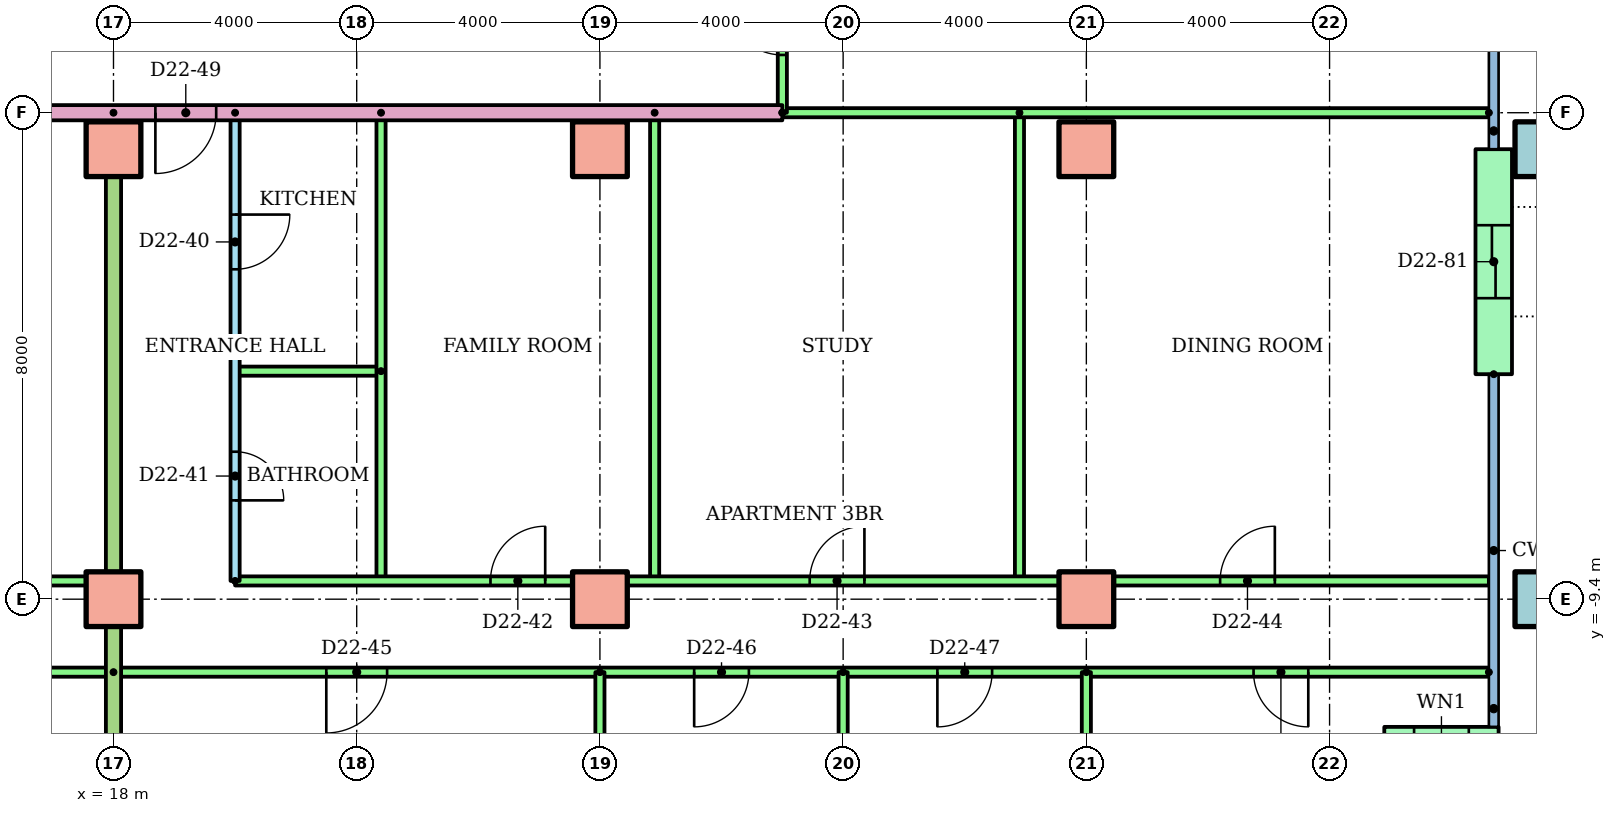
"""IFC4 building model, lengths in metres.
Left out: names, types, materials, properties, quantities, classifications, styles, units other than length and angle.
Written with IfcOpenShell. Run it as: python <this file> out.ifc"""

import sys

from ifc_helpers import new_model, si_unit, direction, frame, frame_2d, origin, origin_2d, place, context, subcontext, project, spatial, rectangle, hollow_rectangle, extrude, element, fill, save


model = new_model("IFC4")
c1 = context("Model", 3, precision=1e-05, world=origin(), true_north=direction((0.0, 1.0)))
c2 = subcontext(c1, "Body", "Model", "MODEL_VIEW")
j1 = project(units=[si_unit("LENGTHUNIT", "METRE"), si_unit("PLANEANGLEUNIT", "RADIAN")], contexts=[c1])
p1 = place(None, origin())
s1 = spatial("IfcSite", under=j1, at=p1, CompositionType="ELEMENT")
p2 = place(p1, origin())
s2 = spatial("IfcBuilding", under=s1, at=p2, CompositionType="ELEMENT")
p3 = place(p2, frame((0.0, 0.0, 87.1)))
s3 = spatial("IfcBuildingStorey", under=s2, at=p3, CompositionType="ELEMENT", Elevation=87.1)
for number, where in (
    (1, (18.0, -9.4, 0.0)),
    (2, (26.0, -9.4, 0.0)),
    (3, (34.0, -9.4, 0.0)),
):
    element("IfcColumn", number, at=place(p3, frame(where)), inside=s3, PredefinedType="COLUMN", context=c2, shape_type="SweptSolid", body=[
        extrude(rectangle(XDim=0.9, YDim=0.9, at=origin_2d()), origin(), (0.0, 0.0, 1.0), 3.2),
    ])
p4 = place(p3, frame((41.5, -9.4, 0.0)))
e4 = element("IfcColumn", 4, at=p4, inside=s3, PredefinedType="COLUMN", context=c2, shape_type="SweptSolid", body=[
    extrude(hollow_rectangle(XDim=0.9, YDim=0.9, WallThickness=0.045, at=origin_2d()), origin(), (0.0, 0.0, 1.0), 3.2),
])
for number, where in (
    (5, (18.0, -2.0, 0.0)),
    (6, (26.0, -2.0, 0.0)),
    (7, (34.0, -2.0, 0.0)),
):
    element("IfcColumn", number, at=place(p3, frame(where)), inside=s3, PredefinedType="COLUMN", context=c2, shape_type="SweptSolid", body=[
        extrude(rectangle(XDim=0.9, YDim=0.9, at=origin_2d()), origin(), (0.0, 0.0, 1.0), 3.2),
    ])
p5 = place(p3, frame((41.5, -2.0, 0.0)))
e8 = element("IfcColumn", 8, at=p5, inside=s3, PredefinedType="COLUMN", context=c2, shape_type="SweptSolid", body=[
    extrude(hollow_rectangle(XDim=0.9, YDim=0.9, WallThickness=0.045, at=origin_2d()), origin(), (0.0, 0.0, 1.0), 3.2),
])
p6 = place(p3, frame((38.9, -11.8, 0.0)))
e9 = element("IfcWall", 9, at=p6, inside=s3, PredefinedType="STANDARD", context=c2, shape_type="SweptSolid", body=[
    extrude(rectangle(XDim=1.88, YDim=0.6, at=frame_2d((0.94, 0.0))), origin(), (0.0, 0.0, 1.0), 2.92),
])
p7 = place(p6, frame((0.49, 0.0, 0.9)))
e10 = element("IfcOpeningElement", 10, at=p7, cuts=e9, PredefinedType="OPENING", context=c2, shape_type="SweptSolid", body=[
    extrude(rectangle(XDim=0.9, YDim=1.5, at=frame_2d((0.45, 0.75))), frame((0.0, 0.31, 0.0), z_axis=(0.0, -1.0, 0.0), x_axis=(1.0, 0.0, 0.0)), (0.0, 0.0, 1.0), 0.62),
])
p8 = place(p3, frame((40.7, -5.7, 0.0), z_axis=(0.0, 0.0, 1.0), x_axis=(0.0, 1.0, 0.0)))
e11 = element("IfcWall", 11, at=p8, inside=s3, PredefinedType="STANDARD", context=c2, shape_type="SweptSolid", body=[
    extrude(rectangle(XDim=3.7, YDim=0.6, at=frame_2d((1.85, 0.0))), origin(), (0.0, 0.0, 1.0), 2.92),
])
p9 = place(p8, frame((1.25, 0.0, 0.0)))
e12 = element("IfcOpeningElement", 12, at=p9, cuts=e11, PredefinedType="OPENING", context=c2, shape_type="SweptSolid", body=[
    extrude(rectangle(XDim=1.2, YDim=2.1, at=frame_2d((0.6, 1.05))), frame((0.0, 0.31, 0.0), z_axis=(0.0, -1.0, 0.0), x_axis=(1.0, 0.0, 0.0)), (0.0, 0.0, 1.0), 0.62),
])
p10 = place(p3, frame((4.0, -9.1, 0.0)))
e13 = element("IfcWall", 13, at=p10, inside=s3, PredefinedType="PARTITIONING", context=c2, shape_type="SweptSolid", body=[
    extrude(rectangle(XDim=14.0, YDim=0.15, at=frame_2d((7.0, 0.0))), origin(), (0.0, 0.0, 1.0), 2.4),
])
p11 = place(p10, frame((3.45, 0.0, 0.0)))
e14 = element("IfcOpeningElement", 14, at=p11, cuts=e13, PredefinedType="OPENING", context=c2, shape_type="SweptSolid", body=[
    extrude(rectangle(XDim=0.9, YDim=2.1, at=frame_2d((0.45, 1.05))), frame((0.0, 0.085, 0.0), z_axis=(0.0, -1.0, 0.0), x_axis=(1.0, 0.0, 0.0)), (0.0, 0.0, 1.0), 0.17),
])
p12 = place(p10, frame((6.825, 0.0, 0.0)))
e15 = element("IfcOpeningElement", 15, at=p12, cuts=e13, PredefinedType="OPENING", context=c2, shape_type="SweptSolid", body=[
    extrude(rectangle(XDim=0.9, YDim=2.1, at=frame_2d((0.45, 1.05))), frame((0.0, 0.085, 0.0), z_axis=(0.0, -1.0, 0.0), x_axis=(1.0, 0.0, 0.0)), (0.0, 0.0, 1.0), 0.17),
])
p13 = place(p10, frame((11.125, 0.0, 0.0)))
e16 = element("IfcOpeningElement", 16, at=p13, cuts=e13, PredefinedType="OPENING", context=c2, shape_type="SweptSolid", body=[
    extrude(rectangle(XDim=0.9, YDim=2.1, at=frame_2d((0.45, 1.05))), frame((0.0, 0.085, 0.0), z_axis=(0.0, -1.0, 0.0), x_axis=(1.0, 0.0, 0.0)), (0.0, 0.0, 1.0), 0.17),
])
p14 = place(p3, frame((18.0, -10.6, 0.0), z_axis=(0.0, 0.0, 1.0), x_axis=(-1.0, 0.0, 0.0)))
e17 = element("IfcWall", 17, at=p14, inside=s3, PredefinedType="PARTITIONING", context=c2, shape_type="SweptSolid", body=[
    extrude(rectangle(XDim=16.0, YDim=0.15, at=frame_2d((8.0, 0.0))), origin(), (0.0, 0.0, 1.0), 2.4),
])
p15 = place(p14, frame((11.5, 0.0, 0.0)))
e18 = element("IfcOpeningElement", 18, at=p15, cuts=e17, PredefinedType="OPENING", context=c2, shape_type="SweptSolid", body=[
    extrude(rectangle(XDim=1.0, YDim=2.1, at=frame_2d((0.5, 1.05))), frame((0.0, 0.085, 0.0), z_axis=(0.0, -1.0, 0.0), x_axis=(1.0, 0.0, 0.0)), (0.0, 0.0, 1.0), 0.17),
])
p16 = place(p14, frame((5.55, 0.0, 0.0)))
e19 = element("IfcOpeningElement", 19, at=p16, cuts=e17, PredefinedType="OPENING", context=c2, shape_type="SweptSolid", body=[
    extrude(rectangle(XDim=0.9, YDim=2.1, at=frame_2d((0.45, 1.05))), frame((0.0, 0.085, 0.0), z_axis=(0.0, -1.0, 0.0), x_axis=(1.0, 0.0, 0.0)), (0.0, 0.0, 1.0), 0.17),
])
p17 = place(p14, frame((1.55, 0.0, 0.0)))
e20 = element("IfcOpeningElement", 20, at=p17, cuts=e17, PredefinedType="OPENING", context=c2, shape_type="SweptSolid", body=[
    extrude(rectangle(XDim=0.9, YDim=2.1, at=frame_2d((0.45, 1.05))), frame((0.0, 0.085, 0.0), z_axis=(0.0, -1.0, 0.0), x_axis=(1.0, 0.0, 0.0)), (0.0, 0.0, 1.0), 0.17),
])
p18 = place(p3, frame((20.0, -1.4, 0.0), z_axis=(0.0, 0.0, 1.0), x_axis=(0.0, -1.0, 0.0)))
e21 = element("IfcWall", 21, at=p18, inside=s3, PredefinedType="PARTITIONING", context=c2, shape_type="SweptSolid", body=[
    extrude(rectangle(XDim=7.7, YDim=0.15, at=frame_2d((3.85, 0.0))), origin(), (0.0, 0.0, 1.0), 2.4),
])
p19 = place(p18, frame((1.675, 0.0, 0.0)))
e22 = element("IfcOpeningElement", 22, at=p19, cuts=e21, PredefinedType="OPENING", context=c2, shape_type="SweptSolid", body=[
    extrude(rectangle(XDim=0.9, YDim=2.1, at=frame_2d((0.45, 1.05))), frame((0.0, 0.085, 0.0), z_axis=(0.0, -1.0, 0.0), x_axis=(1.0, 0.0, 0.0)), (0.0, 0.0, 1.0), 0.17),
])
p20 = place(p18, frame((5.575, 0.0, 0.0)))
e23 = element("IfcOpeningElement", 23, at=p20, cuts=e21, PredefinedType="OPENING", context=c2, shape_type="SweptSolid", body=[
    extrude(rectangle(XDim=0.8, YDim=2.1, at=frame_2d((0.4, 1.05))), frame((0.0, 0.085, 0.0), z_axis=(0.0, -1.0, 0.0), x_axis=(1.0, 0.0, 0.0)), (0.0, 0.0, 1.0), 0.17),
])
p21 = place(p3, frame((22.4, -5.65, 0.0), z_axis=(0.0, 0.0, 1.0), x_axis=(-1.0, 0.0, 0.0)))
e24 = element("IfcWall", 24, at=p21, inside=s3, PredefinedType="PARTITIONING", context=c2, shape_type="SweptSolid", body=[
    extrude(rectangle(XDim=2.4, YDim=0.15, at=frame_2d((1.2, 0.0))), origin(), (0.0, 0.0, 1.0), 2.4),
])
for number, where, z_axis, x_axis in (
    (25, (22.4, -1.4, 0.0), (0.0, 0.0, 1.0), (0.0, -1.0, 0.0)),
    (26, (26.9, -1.4, 0.0), (0.0, 0.0, 1.0), (0.0, -1.0, 0.0)),
    (27, (32.9, -1.4, 0.0), (0.0, 0.0, 1.0), (0.0, -1.0, 0.0)),
):
    element("IfcWall", number, at=place(p3, frame(where, z_axis=z_axis, x_axis=x_axis)), inside=s3, PredefinedType="PARTITIONING", context=c2, shape_type="SweptSolid", body=[
        extrude(rectangle(XDim=7.7, YDim=0.15, at=frame_2d((3.85, 0.0))), origin(), (0.0, 0.0, 1.0), 2.4),
    ])
p22 = place(p3, frame((20.0, -9.1, 0.0)))
e28 = element("IfcWall", 28, at=p22, inside=s3, PredefinedType="PARTITIONING", context=c2, shape_type="SweptSolid", body=[
    extrude(rectangle(XDim=20.62, YDim=0.15, at=frame_2d((10.31, 0.0))), origin(), (0.0, 0.0, 1.0), 2.4),
])
p23 = place(p22, frame((4.2, 0.0, 0.0)))
e29 = element("IfcOpeningElement", 29, at=p23, cuts=e28, PredefinedType="OPENING", context=c2, shape_type="SweptSolid", body=[
    extrude(rectangle(XDim=0.9, YDim=2.1, at=frame_2d((0.45, 1.05))), frame((0.0, 0.085, 0.0), z_axis=(0.0, -1.0, 0.0), x_axis=(1.0, 0.0, 0.0)), (0.0, 0.0, 1.0), 0.17),
])
p24 = place(p22, frame((9.45, 0.0, 0.0)))
e30 = element("IfcOpeningElement", 30, at=p24, cuts=e28, PredefinedType="OPENING", context=c2, shape_type="SweptSolid", body=[
    extrude(rectangle(XDim=0.9, YDim=2.1, at=frame_2d((0.45, 1.05))), frame((0.0, 0.085, 0.0), z_axis=(0.0, -1.0, 0.0), x_axis=(1.0, 0.0, 0.0)), (0.0, 0.0, 1.0), 0.17),
])
p25 = place(p22, frame((16.2, 0.0, 0.0)))
e31 = element("IfcOpeningElement", 31, at=p25, cuts=e28, PredefinedType="OPENING", context=c2, shape_type="SweptSolid", body=[
    extrude(rectangle(XDim=0.9, YDim=2.1, at=frame_2d((0.45, 1.05))), frame((0.0, 0.085, 0.0), z_axis=(0.0, -1.0, 0.0), x_axis=(1.0, 0.0, 0.0)), (0.0, 0.0, 1.0), 0.17),
])
p26 = place(p3, frame((40.62, -10.6, 0.0), z_axis=(0.0, 0.0, 1.0), x_axis=(-1.0, 0.0, 0.0)))
e32 = element("IfcWall", 32, at=p26, inside=s3, PredefinedType="PARTITIONING", context=c2, shape_type="SweptSolid", body=[
    extrude(rectangle(XDim=22.62, YDim=0.15, at=frame_2d((11.31, 0.0))), origin(), (0.0, 0.0, 1.0), 2.4),
])
p27 = place(p26, frame((18.12, 0.0, 0.0)))
e33 = element("IfcOpeningElement", 33, at=p27, cuts=e32, PredefinedType="OPENING", context=c2, shape_type="SweptSolid", body=[
    extrude(rectangle(XDim=1.0, YDim=2.1, at=frame_2d((0.5, 1.05))), frame((0.0, 0.085, 0.0), z_axis=(0.0, -1.0, 0.0), x_axis=(1.0, 0.0, 0.0)), (0.0, 0.0, 1.0), 0.17),
])
p28 = place(p26, frame((12.17, 0.0, 0.0)))
e34 = element("IfcOpeningElement", 34, at=p28, cuts=e32, PredefinedType="OPENING", context=c2, shape_type="SweptSolid", body=[
    extrude(rectangle(XDim=0.9, YDim=2.1, at=frame_2d((0.45, 1.05))), frame((0.0, 0.085, 0.0), z_axis=(0.0, -1.0, 0.0), x_axis=(1.0, 0.0, 0.0)), (0.0, 0.0, 1.0), 0.17),
])
p29 = place(p26, frame((8.17, 0.0, 0.0)))
e35 = element("IfcOpeningElement", 35, at=p29, cuts=e32, PredefinedType="OPENING", context=c2, shape_type="SweptSolid", body=[
    extrude(rectangle(XDim=0.9, YDim=2.1, at=frame_2d((0.45, 1.05))), frame((0.0, 0.085, 0.0), z_axis=(0.0, -1.0, 0.0), x_axis=(1.0, 0.0, 0.0)), (0.0, 0.0, 1.0), 0.17),
])
p30 = place(p26, frame((2.97, 0.0, 0.0)))
e36 = element("IfcOpeningElement", 36, at=p30, cuts=e32, PredefinedType="OPENING", context=c2, shape_type="SweptSolid", body=[
    extrude(rectangle(XDim=0.9, YDim=2.1, at=frame_2d((0.45, 1.05))), frame((0.0, 0.085, 0.0), z_axis=(0.0, -1.0, 0.0), x_axis=(1.0, 0.0, 0.0)), (0.0, 0.0, 1.0), 0.17),
])
p31 = place(p3, frame((26.0, -10.6, 0.0), z_axis=(0.0, 0.0, 1.0), x_axis=(0.0, -1.0, 0.0)))
e37 = element("IfcWall", 37, at=p31, inside=s3, PredefinedType="PARTITIONING", context=c2, shape_type="SweptSolid", body=[
    extrude(rectangle(XDim=5.61, YDim=0.15, at=frame_2d((2.805, 0.0))), origin(), (0.0, 0.0, 1.0), 2.4),
])
p32 = place(p3, frame((30.0, -10.6, 0.0), z_axis=(0.0, 0.0, 1.0), x_axis=(0.0, -1.0, 0.0)))
e38 = element("IfcWall", 38, at=p32, inside=s3, PredefinedType="PARTITIONING", context=c2, shape_type="SweptSolid", body=[
    extrude(rectangle(XDim=5.621, YDim=0.15, at=frame_2d((2.811, 0.0))), origin(), (0.0, 0.0, 1.0), 2.4),
])
p33 = place(p3, frame((34.0, -10.6, 0.0), z_axis=(0.0, 0.0, 1.0), x_axis=(0.0, -1.0, 0.0)))
e39 = element("IfcWall", 39, at=p33, inside=s3, PredefinedType="PARTITIONING", context=c2, shape_type="SweptSolid", body=[
    extrude(rectangle(XDim=5.61, YDim=0.15, at=frame_2d((2.805, 0.0))), origin(), (0.0, 0.0, 1.0), 2.4),
])
p34 = place(p3, frame((18.0, -1.4, 0.0), z_axis=(0.0, 0.0, 1.0), x_axis=(0.0, -1.0, 0.0)))
e40 = element("IfcWall", 40, at=p34, inside=s3, PredefinedType="PARTITIONING", context=c2, shape_type="SweptSolid", body=[
    extrude(rectangle(XDim=14.81, YDim=0.25, at=frame_2d((7.405, 0.0))), origin(), (0.0, 0.0, 1.0), 2.4),
])
p35 = place(p3, frame((29.0, -1.4, 0.0), z_axis=(0.0, 0.0, 1.0), x_axis=(-1.0, 0.0, 0.0)))
e41 = element("IfcWall", 41, at=p35, inside=s3, PredefinedType="PARTITIONING", context=c2, shape_type="SweptSolid", body=[
    extrude(rectangle(XDim=15.0, YDim=0.25, at=frame_2d((7.5, 0.0))), origin(), (0.0, 0.0, 1.0), 2.4),
])
p36 = place(p35, frame((9.311, 0.0, 0.0)))
e42 = element("IfcOpeningElement", 42, at=p36, cuts=e41, PredefinedType="OPENING", context=c2, shape_type="SweptSolid", body=[
    extrude(rectangle(XDim=1.0, YDim=2.1, at=frame_2d((0.5, 1.05))), frame((0.0, 0.135, 0.0), z_axis=(0.0, -1.0, 0.0), x_axis=(1.0, 0.0, 0.0)), (0.0, 0.0, 1.0), 0.27),
])
p37 = place(p3, frame((40.62, -1.4, 0.0), z_axis=(0.0, 0.0, 1.0), x_axis=(-1.0, 0.0, 0.0)))
e43 = element("IfcWall", 43, at=p37, inside=s3, PredefinedType="PARTITIONING", context=c2, shape_type="SweptSolid", body=[
    extrude(rectangle(XDim=11.62, YDim=0.15, at=frame_2d((5.81, 0.0))), origin(), (0.0, 0.0, 1.0), 2.4),
])
p38 = place(p3, frame((29.0, -1.4, 0.0), z_axis=(0.0, 0.0, 1.0), x_axis=(0.0, 1.0, 0.0)))
e44 = element("IfcWall", 44, at=p38, inside=s3, PredefinedType="PARTITIONING", context=c2, shape_type="SweptSolid", body=[
    extrude(rectangle(XDim=2.8, YDim=0.15, at=frame_2d((1.4, 0.0))), origin(), (0.0, 0.0, 1.0), 2.4),
])
p39 = place(p38, frame((0.95, 0.0, 0.0)))
e45 = element("IfcOpeningElement", 45, at=p39, cuts=e44, PredefinedType="OPENING", context=c2, shape_type="SweptSolid", body=[
    extrude(rectangle(XDim=0.9, YDim=2.1, at=frame_2d((0.45, 1.05))), frame((0.0, 0.085, 0.0), z_axis=(0.0, -1.0, 0.0), x_axis=(1.0, 0.0, 0.0)), (0.0, 0.0, 1.0), 0.17),
])
p40 = place(p19, origin())
e46 = element("IfcDoor", 46, at=p40, inside=s3, OperationType="SINGLE_SWING_LEFT", PredefinedType="DOOR", context=c2, shape_type="SweptSolid", body=[
    extrude(rectangle(XDim=0.9, YDim=2.1, at=frame_2d((0.45, 1.05))), frame((0.0, 0.025, 0.0), z_axis=(0.0, -1.0, 0.0), x_axis=(1.0, 0.0, 0.0)), (0.0, 0.0, 1.0), 0.05),
])
fill(e22, e46)
p41 = place(p20, origin())
e47 = element("IfcDoor", 47, at=p41, inside=s3, OperationType="SINGLE_SWING_RIGHT", PredefinedType="DOOR", context=c2, shape_type="SweptSolid", body=[
    extrude(rectangle(XDim=0.8, YDim=2.1, at=frame_2d((0.4, 1.05))), frame((0.0, 0.025, 0.0), z_axis=(0.0, -1.0, 0.0), x_axis=(1.0, 0.0, 0.0)), (0.0, 0.0, 1.0), 0.05),
])
fill(e23, e47)
p42 = place(p23, origin())
e48 = element("IfcDoor", 48, at=p42, inside=s3, OperationType="SINGLE_SWING_RIGHT", PredefinedType="DOOR", context=c2, shape_type="SweptSolid", body=[
    extrude(rectangle(XDim=0.9, YDim=2.1, at=frame_2d((0.45, 1.05))), frame((0.0, 0.025, 0.0), z_axis=(0.0, -1.0, 0.0), x_axis=(1.0, 0.0, 0.0)), (0.0, 0.0, 1.0), 0.05),
])
fill(e29, e48)
p43 = place(p24, origin())
e49 = element("IfcDoor", 49, at=p43, inside=s3, OperationType="SINGLE_SWING_RIGHT", PredefinedType="DOOR", context=c2, shape_type="SweptSolid", body=[
    extrude(rectangle(XDim=0.9, YDim=2.1, at=frame_2d((0.45, 1.05))), frame((0.0, 0.025, 0.0), z_axis=(0.0, -1.0, 0.0), x_axis=(1.0, 0.0, 0.0)), (0.0, 0.0, 1.0), 0.05),
])
fill(e30, e49)
p44 = place(p25, origin())
e50 = element("IfcDoor", 50, at=p44, inside=s3, OperationType="SINGLE_SWING_RIGHT", PredefinedType="DOOR", context=c2, shape_type="SweptSolid", body=[
    extrude(rectangle(XDim=0.9, YDim=2.1, at=frame_2d((0.45, 1.05))), frame((0.0, 0.025, 0.0), z_axis=(0.0, -1.0, 0.0), x_axis=(1.0, 0.0, 0.0)), (0.0, 0.0, 1.0), 0.05),
])
fill(e31, e50)
p45 = place(p27, origin())
e51 = element("IfcDoor", 51, at=p45, inside=s3, OperationType="SINGLE_SWING_RIGHT", PredefinedType="DOOR", context=c2, shape_type="SweptSolid", body=[
    extrude(rectangle(XDim=1.0, YDim=2.1, at=frame_2d((0.5, 1.05))), frame((0.0, 0.025, 0.0), z_axis=(0.0, -1.0, 0.0), x_axis=(1.0, 0.0, 0.0)), (0.0, 0.0, 1.0), 0.05),
])
fill(e33, e51)
p46 = place(p28, origin())
e52 = element("IfcDoor", 52, at=p46, inside=s3, OperationType="SINGLE_SWING_RIGHT", PredefinedType="DOOR", context=c2, shape_type="SweptSolid", body=[
    extrude(rectangle(XDim=0.9, YDim=2.1, at=frame_2d((0.45, 1.05))), frame((0.0, 0.025, 0.0), z_axis=(0.0, -1.0, 0.0), x_axis=(1.0, 0.0, 0.0)), (0.0, 0.0, 1.0), 0.05),
])
fill(e34, e52)
p47 = place(p29, origin())
e53 = element("IfcDoor", 53, at=p47, inside=s3, OperationType="SINGLE_SWING_RIGHT", PredefinedType="DOOR", context=c2, shape_type="SweptSolid", body=[
    extrude(rectangle(XDim=0.9, YDim=2.1, at=frame_2d((0.45, 1.05))), frame((0.0, 0.025, 0.0), z_axis=(0.0, -1.0, 0.0), x_axis=(1.0, 0.0, 0.0)), (0.0, 0.0, 1.0), 0.05),
])
fill(e35, e53)
p48 = place(p30, origin())
e54 = element("IfcDoor", 54, at=p48, inside=s3, OperationType="SINGLE_SWING_LEFT", PredefinedType="DOOR", context=c2, shape_type="SweptSolid", body=[
    extrude(rectangle(XDim=0.9, YDim=2.1, at=frame_2d((0.45, 1.05))), frame((0.0, 0.025, 0.0), z_axis=(0.0, -1.0, 0.0), x_axis=(1.0, 0.0, 0.0)), (0.0, 0.0, 1.0), 0.05),
])
fill(e36, e54)
p49 = place(p36, origin())
e55 = element("IfcDoor", 55, at=p49, inside=s3, OperationType="SINGLE_SWING_RIGHT", PredefinedType="DOOR", context=c2, shape_type="SweptSolid", body=[
    extrude(rectangle(XDim=1.0, YDim=2.1, at=frame_2d((0.5, 1.05))), frame((0.0, 0.025, 0.0), z_axis=(0.0, -1.0, 0.0), x_axis=(1.0, 0.0, 0.0)), (0.0, 0.0, 1.0), 0.05),
])
fill(e42, e55)
p50 = place(p39, origin())
e56 = element("IfcDoor", 56, at=p50, inside=s3, OperationType="SINGLE_SWING_RIGHT", PredefinedType="DOOR", context=c2, shape_type="SweptSolid", body=[
    extrude(rectangle(XDim=0.9, YDim=2.1, at=frame_2d((0.45, 1.05))), frame((0.0, 0.025, 0.0), z_axis=(0.0, -1.0, 0.0), x_axis=(1.0, 0.0, 0.0)), (0.0, 0.0, 1.0), 0.05),
])
fill(e45, e56)
p51 = place(p9, origin())
e57 = element("IfcDoor", 57, at=p51, inside=s3, OperationType="SLIDING_TO_LEFT", PredefinedType="DOOR", context=c2, shape_type="SweptSolid", body=[
    extrude(rectangle(XDim=1.2, YDim=2.1, at=frame_2d((0.6, 1.05))), frame((0.0, 0.025, 0.0), z_axis=(0.0, -1.0, 0.0), x_axis=(1.0, 0.0, 0.0)), (0.0, 0.0, 1.0), 0.05),
])
fill(e12, e57)
save(model, sys.argv[1])
